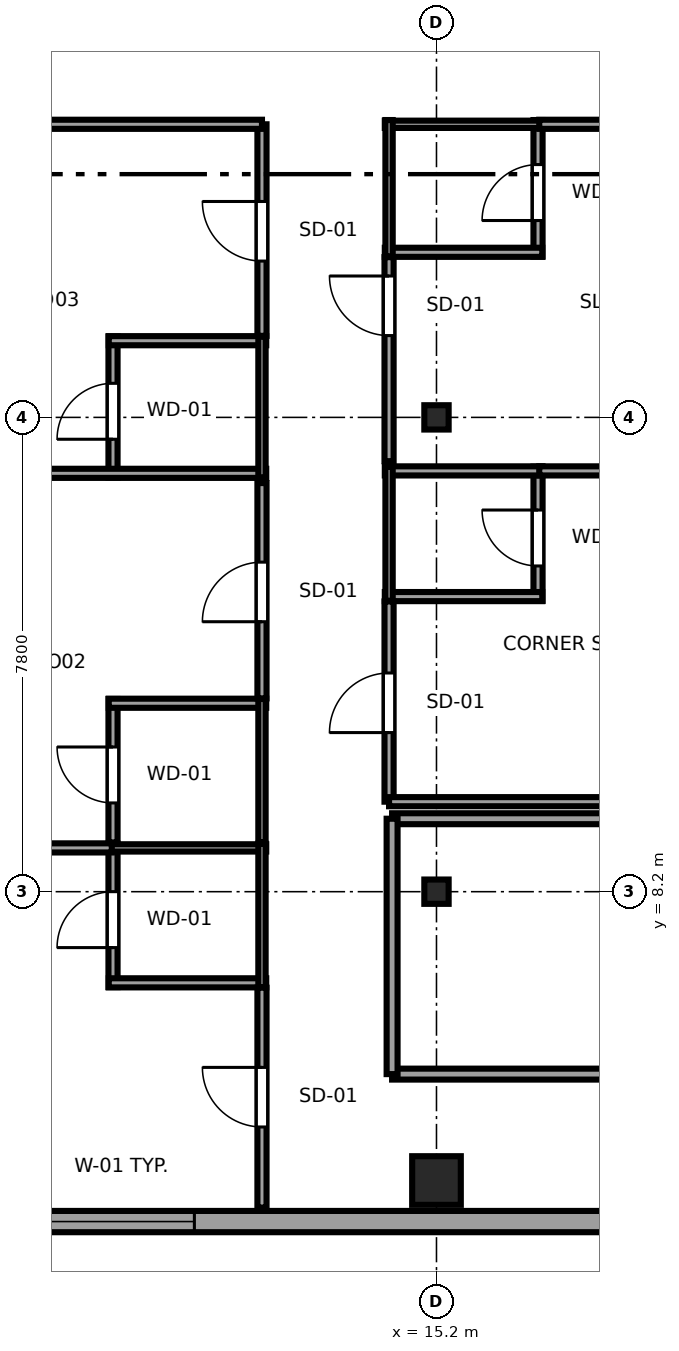
"""IFC4 building model, lengths in metres.
Left out: names, types, materials, properties, quantities, classifications, styles, units other than length and angle.
Written with IfcOpenShell. Run it as: python <this file> out.ifc"""

import sys

from ifc_helpers import new_model, si_unit, direction, frame, frame_2d, origin, origin_2d, place, context, subcontext, project, spatial, rectangle, i_section, extrude, source, transform, mapped, element, fill, save


model = new_model("IFC4")
c1 = context("Model", 3, precision=1e-05, world=origin(), true_north=direction((0.0, 1.0)))
c2 = subcontext(c1, "Body", "Model", "MODEL_VIEW")
j1 = project(units=[si_unit("LENGTHUNIT", "METRE"), si_unit("PLANEANGLEUNIT", "RADIAN")], contexts=[c1])
p1 = place(None, origin())
s1 = spatial("IfcSite", under=j1, at=p1, CompositionType="ELEMENT")
p2 = place(p1, origin())
s2 = spatial("IfcBuilding", under=s1, at=p2, CompositionType="ELEMENT")
p3 = place(p2, frame((0.0, 0.0, 168.35)))
s3 = spatial("IfcBuildingStorey", under=s2, at=p3, CompositionType="ELEMENT", Elevation=168.35)
m1 = source(origin(), c2, "Body", "SweptSolid", [
    extrude(rectangle(XDim=0.8, YDim=0.8, at=origin_2d()), origin(), (0.0, 0.0, 1.0), 3.55),
])
p4 = place(p3, frame((15.2, 3.45, 0.0), z_axis=(0.0, 0.0, 1.0), x_axis=(1.0, 0.0, 0.0)))
e1 = element("IfcColumn", 1, at=p4, inside=s3, PredefinedType="COLUMN", context=c2, shape_type="MappedRepresentation", body=[
    mapped(m1, transform((0.0, 0.0, 0.0), x_axis=(1.0, 0.0, 0.0), y_axis=(0.0, 1.0, 0.0), z_axis=(0.0, 0.0, 1.0), scale=1.0)),
])
m2 = source(origin(), c2, "Body", "SweptSolid", [
    extrude(i_section(OverallWidth=0.4, OverallDepth=0.4, WebThickness=0.02, FlangeThickness=0.035, at=origin_2d()), origin(), (0.0, 0.0, 1.0), 3.55),
])
for number, where, z_axis, x_axis in (
    (2, (15.2, 8.2, 0.0), (0.0, 0.0, 1.0), (1.0, 0.0, 0.0)),
    (3, (15.2, 16.0, 0.0), (0.0, 0.0, 1.0), (1.0, 0.0, 0.0)),
):
    element("IfcColumn", number, at=place(p3, frame(where, z_axis=z_axis, x_axis=x_axis)), inside=s3, PredefinedType="COLUMN", context=c2, shape_type="MappedRepresentation", body=[
        mapped(m2, transform((0.0, 0.0, 0.0), x_axis=(1.0, 0.0, 0.0), y_axis=(0.0, 1.0, 0.0), z_axis=(0.0, 0.0, 1.0), scale=1.0)),
    ])
p5 = place(p3, frame((7.017, 2.775, 0.0), z_axis=(0.0, 0.0, 1.0), x_axis=(1.0, 0.0, 0.0)))
e4 = element("IfcWall", 4, at=p5, inside=s3, PredefinedType="SOLIDWALL", context=c2, shape_type="SweptSolid", body=[
    extrude(rectangle(XDim=15.608, YDim=0.35, at=frame_2d((7.804, 0.0))), origin(), (0.0, 0.0, 1.0), 3.37),
])
p6 = place(p5, frame((1.801, 0.0, 0.68)))
e5 = element("IfcOpeningElement", 5, at=p6, cuts=e4, PredefinedType="OPENING", context=c2, shape_type="SweptSolid", body=[
    extrude(rectangle(XDim=2.4, YDim=1.9, at=frame_2d((1.2, 0.95))), frame((0.0, 0.185, 0.0), z_axis=(0.0, -1.0, 0.0), x_axis=(1.0, 0.0, 0.0)), (0.0, 0.0, 1.0), 0.37),
])
p7 = place(p5, frame((11.407, 0.0, 0.68)))
e6 = element("IfcOpeningElement", 6, at=p7, cuts=e4, PredefinedType="OPENING", context=c2, shape_type="SweptSolid", body=[
    extrude(rectangle(XDim=2.4, YDim=1.9, at=frame_2d((1.2, 0.95))), frame((0.0, 0.185, 0.0), z_axis=(0.0, -1.0, 0.0), x_axis=(1.0, 0.0, 0.0)), (0.0, 0.0, 1.0), 0.37),
])
p8 = place(p3, frame((9.88, 6.631, 0.0), z_axis=(0.0, 0.0, 1.0), x_axis=(0.0, 1.0, 0.0)))
e7 = element("IfcWall", 7, at=p8, inside=s3, PredefinedType="PARTITIONING", context=c2, shape_type="SweptSolid", body=[
    extrude(rectangle(XDim=2.359, YDim=0.15, at=frame_2d((1.179, 0.0))), origin(), (0.0, 0.0, 1.0), 3.37),
])
p9 = place(p8, frame((0.649, 0.0, 0.0)))
e8 = element("IfcOpeningElement", 8, at=p9, cuts=e7, PredefinedType="OPENING", context=c2, shape_type="SweptSolid", body=[
    extrude(rectangle(XDim=0.92, YDim=2.01, at=frame_2d((0.46, 1.005))), frame((0.0, 0.085, 0.0), z_axis=(0.0, -1.0, 0.0), x_axis=(1.0, 0.0, 0.0)), (0.0, 0.0, 1.0), 0.17),
])
p10 = place(p3, frame((9.81, 6.701, 0.0), z_axis=(0.0, 0.0, 1.0), x_axis=(1.0, 0.0, 0.0)))
e9 = element("IfcWall", 9, at=p10, inside=s3, PredefinedType="PARTITIONING", context=c2, shape_type="SweptSolid", body=[
    extrude(rectangle(XDim=2.59, YDim=0.15, at=frame_2d((1.295, 0.0))), origin(), (0.0, 0.0, 1.0), 3.37),
])
p11 = place(p3, frame((9.81, 8.92, 0.0), z_axis=(0.0, 0.0, 1.0), x_axis=(1.0, 0.0, 0.0)))
e10 = element("IfcWall", 10, at=p11, inside=s3, PredefinedType="PLUMBINGWALL", context=c2, shape_type="SweptSolid", body=[
    extrude(rectangle(XDim=2.59, YDim=0.12, at=frame_2d((1.295, 0.0))), origin(), (0.0, 0.0, 1.0), 3.37),
])
p12 = place(p3, frame((12.33, 6.631, 0.0), z_axis=(0.0, 0.0, 1.0), x_axis=(0.0, 1.0, 0.0)))
e11 = element("IfcWall", 11, at=p12, inside=s3, PredefinedType="PLUMBINGWALL", context=c2, shape_type="SweptSolid", body=[
    extrude(rectangle(XDim=2.359, YDim=0.12, at=frame_2d((1.179, 0.0))), origin(), (0.0, 0.0, 1.0), 3.37),
])
p13 = place(p3, frame((9.88, 9.01, 0.0), z_axis=(0.0, 0.0, 1.0), x_axis=(0.0, 1.0, 0.0)))
e12 = element("IfcWall", 12, at=p13, inside=s3, PredefinedType="PARTITIONING", context=c2, shape_type="SweptSolid", body=[
    extrude(rectangle(XDim=2.359, YDim=0.15, at=frame_2d((1.179, 0.0))), origin(), (0.0, 0.0, 1.0), 3.37),
])
p14 = place(p13, frame((0.649, 0.0, 0.0)))
e13 = element("IfcOpeningElement", 13, at=p14, cuts=e12, PredefinedType="OPENING", context=c2, shape_type="SweptSolid", body=[
    extrude(rectangle(XDim=0.92, YDim=2.01, at=frame_2d((0.46, 1.005))), frame((0.0, 0.085, 0.0), z_axis=(0.0, -1.0, 0.0), x_axis=(1.0, 0.0, 0.0)), (0.0, 0.0, 1.0), 0.17),
])
p15 = place(p3, frame((9.81, 11.299, 0.0), z_axis=(0.0, 0.0, 1.0), x_axis=(1.0, 0.0, 0.0)))
e14 = element("IfcWall", 14, at=p15, inside=s3, PredefinedType="PARTITIONING", context=c2, shape_type="SweptSolid", body=[
    extrude(rectangle(XDim=2.59, YDim=0.15, at=frame_2d((1.295, 0.0))), origin(), (0.0, 0.0, 1.0), 3.37),
])
p16 = place(p3, frame((12.33, 9.01, 0.0), z_axis=(0.0, 0.0, 1.0), x_axis=(0.0, 1.0, 0.0)))
e15 = element("IfcWall", 15, at=p16, inside=s3, PredefinedType="PLUMBINGWALL", context=c2, shape_type="SweptSolid", body=[
    extrude(rectangle(XDim=2.359, YDim=0.12, at=frame_2d((1.179, 0.0))), origin(), (0.0, 0.0, 1.0), 3.37),
])
p17 = place(p3, frame((9.88, 15.01, 0.0), z_axis=(0.0, 0.0, 1.0), x_axis=(0.0, 1.0, 0.0)))
e16 = element("IfcWall", 16, at=p17, inside=s3, PredefinedType="PARTITIONING", context=c2, shape_type="SweptSolid", body=[
    extrude(rectangle(XDim=2.321, YDim=0.15, at=frame_2d((1.161, 0.0))), origin(), (0.0, 0.0, 1.0), 3.37),
])
p18 = place(p17, frame((0.631, 0.0, 0.0)))
e17 = element("IfcOpeningElement", 17, at=p18, cuts=e16, PredefinedType="OPENING", context=c2, shape_type="SweptSolid", body=[
    extrude(rectangle(XDim=0.92, YDim=2.01, at=frame_2d((0.46, 1.005))), frame((0.0, 0.085, 0.0), z_axis=(0.0, -1.0, 0.0), x_axis=(1.0, 0.0, 0.0)), (0.0, 0.0, 1.0), 0.17),
])
p19 = place(p3, frame((3.005, 15.08, 0.0), z_axis=(0.0, 0.0, 1.0), x_axis=(1.0, 0.0, 0.0)))
e18 = element("IfcWall", 18, at=p19, inside=s3, PredefinedType="PARTITIONING", context=c2, shape_type="SweptSolid", body=[
    extrude(rectangle(XDim=9.395, YDim=0.15, at=frame_2d((4.698, 0.0))), origin(), (0.0, 0.0, 1.0), 3.37),
])
p20 = place(p3, frame((9.81, 17.261, 0.0), z_axis=(0.0, 0.0, 1.0), x_axis=(1.0, 0.0, 0.0)))
e19 = element("IfcWall", 19, at=p20, inside=s3, PredefinedType="PARTITIONING", context=c2, shape_type="SweptSolid", body=[
    extrude(rectangle(XDim=2.59, YDim=0.15, at=frame_2d((1.295, 0.0))), origin(), (0.0, 0.0, 1.0), 3.37),
])
p21 = place(p3, frame((12.33, 15.01, 0.0), z_axis=(0.0, 0.0, 1.0), x_axis=(0.0, 1.0, 0.0)))
e20 = element("IfcWall", 20, at=p21, inside=s3, PredefinedType="PLUMBINGWALL", context=c2, shape_type="SweptSolid", body=[
    extrude(rectangle(XDim=2.321, YDim=0.12, at=frame_2d((1.161, 0.0))), origin(), (0.0, 0.0, 1.0), 3.37),
])
p22 = place(p3, frame((16.87, 12.983, 0.0), z_axis=(0.0, 0.0, 1.0), x_axis=(0.0, 1.0, 0.0)))
e21 = element("IfcWall", 21, at=p22, inside=s3, PredefinedType="PARTITIONING", context=c2, shape_type="SweptSolid", body=[
    extrude(rectangle(XDim=2.207, YDim=0.15, at=frame_2d((1.104, 0.0))), origin(), (0.0, 0.0, 1.0), 3.37),
])
p23 = place(p22, frame((0.573, 0.0, 0.0)))
e22 = element("IfcOpeningElement", 22, at=p23, cuts=e21, PredefinedType="OPENING", context=c2, shape_type="SweptSolid", body=[
    extrude(rectangle(XDim=0.92, YDim=2.01, at=frame_2d((0.46, 1.005))), frame((0.0, 0.085, 0.0), z_axis=(0.0, -1.0, 0.0), x_axis=(1.0, 0.0, 0.0)), (0.0, 0.0, 1.0), 0.17),
])
for number, where, z_axis, x_axis in (
    (23, (14.35, 13.053, 0.0), (0.0, 0.0, 1.0), (1.0, 0.0, 0.0)),
    (24, (14.35, 15.12, 0.0), (0.0, 0.0, 1.0), (1.0, 0.0, 0.0)),
):
    element("IfcWall", number, at=place(p3, frame(where, z_axis=z_axis, x_axis=x_axis)), inside=s3, PredefinedType="PARTITIONING", context=c2, shape_type="SweptSolid", body=[
        extrude(rectangle(XDim=2.59, YDim=0.15, at=frame_2d((1.295, 0.0))), origin(), (0.0, 0.0, 1.0), 3.37),
    ])
p24 = place(p3, frame((14.42, 12.983, 0.0), z_axis=(0.0, 0.0, 1.0), x_axis=(0.0, 1.0, 0.0)))
e25 = element("IfcWall", 25, at=p24, inside=s3, PredefinedType="PLUMBINGWALL", context=c2, shape_type="SweptSolid", body=[
    extrude(rectangle(XDim=2.207, YDim=0.12, at=frame_2d((1.104, 0.0))), origin(), (0.0, 0.0, 1.0), 3.37),
])
p25 = place(p3, frame((16.87, 18.645, 0.0), z_axis=(0.0, 0.0, 1.0), x_axis=(0.0, 1.0, 0.0)))
e26 = element("IfcWall", 26, at=p25, inside=s3, PredefinedType="PARTITIONING", context=c2, shape_type="SweptSolid", body=[
    extrude(rectangle(XDim=2.245, YDim=0.15, at=frame_2d((1.123, 0.0))), origin(), (0.0, 0.0, 1.0), 3.37),
])
p26 = place(p25, frame((0.593, 0.0, 0.0)))
e27 = element("IfcOpeningElement", 27, at=p26, cuts=e26, PredefinedType="OPENING", context=c2, shape_type="SweptSolid", body=[
    extrude(rectangle(XDim=0.92, YDim=2.01, at=frame_2d((0.46, 1.005))), frame((0.0, 0.085, 0.0), z_axis=(0.0, -1.0, 0.0), x_axis=(1.0, 0.0, 0.0)), (0.0, 0.0, 1.0), 0.17),
])
p27 = place(p3, frame((14.35, 18.715, 0.0), z_axis=(0.0, 0.0, 1.0), x_axis=(1.0, 0.0, 0.0)))
e28 = element("IfcWall", 28, at=p27, inside=s3, PredefinedType="PARTITIONING", context=c2, shape_type="SweptSolid", body=[
    extrude(rectangle(XDim=2.59, YDim=0.15, at=frame_2d((1.295, 0.0))), origin(), (0.0, 0.0, 1.0), 3.37),
])
p28 = place(p3, frame((14.35, 20.82, 0.0), z_axis=(0.0, 0.0, 1.0), x_axis=(1.0, 0.0, 0.0)))
e29 = element("IfcWall", 29, at=p28, inside=s3, PredefinedType="PLUMBINGWALL", context=c2, shape_type="SweptSolid", body=[
    extrude(rectangle(XDim=2.59, YDim=0.12, at=frame_2d((1.295, 0.0))), origin(), (0.0, 0.0, 1.0), 3.37),
])
p29 = place(p3, frame((14.42, 18.645, 0.0), z_axis=(0.0, 0.0, 1.0), x_axis=(0.0, 1.0, 0.0)))
e30 = element("IfcWall", 30, at=p29, inside=s3, PredefinedType="PLUMBINGWALL", context=c2, shape_type="SweptSolid", body=[
    extrude(rectangle(XDim=2.245, YDim=0.12, at=frame_2d((1.123, 0.0))), origin(), (0.0, 0.0, 1.0), 3.37),
])
p30 = place(p3, frame((12.33, 3.005, 0.0), z_axis=(0.0, 0.0, 1.0), x_axis=(0.0, 1.0, 0.0)))
e31 = element("IfcWall", 31, at=p30, inside=s3, PredefinedType="PARTITIONING", context=c2, shape_type="SweptSolid", body=[
    extrude(rectangle(XDim=3.616, YDim=0.15, at=frame_2d((1.808, 0.0))), origin(), (0.0, 0.0, 1.0), 3.37),
])
p31 = place(p30, frame((1.325, 0.0, 0.0)))
e32 = element("IfcOpeningElement", 32, at=p31, cuts=e31, PredefinedType="OPENING", context=c2, shape_type="SweptSolid", body=[
    extrude(rectangle(XDim=0.98, YDim=2.12, at=frame_2d((0.49, 1.06))), frame((0.0, 0.085, 0.0), z_axis=(0.0, -1.0, 0.0), x_axis=(1.0, 0.0, 0.0)), (0.0, 0.0, 1.0), 0.17),
])
p32 = place(p3, frame((3.005, 8.92, 0.0), z_axis=(0.0, 0.0, 1.0), x_axis=(1.0, 0.0, 0.0)))
e33 = element("IfcWall", 33, at=p32, inside=s3, PredefinedType="PARTITIONING", context=c2, shape_type="SweptSolid", body=[
    extrude(rectangle(XDim=6.855, YDim=0.15, at=frame_2d((3.428, 0.0))), origin(), (0.0, 0.0, 1.0), 3.37),
])
p33 = place(p3, frame((12.33, 11.379, 0.0), z_axis=(0.0, 0.0, 1.0), x_axis=(0.0, 1.0, 0.0)))
e34 = element("IfcWall", 34, at=p33, inside=s3, PredefinedType="PARTITIONING", context=c2, shape_type="SweptSolid", body=[
    extrude(rectangle(XDim=3.541, YDim=0.15, at=frame_2d((1.771, 0.0))), origin(), (0.0, 0.0, 1.0), 3.37),
])
p34 = place(p33, frame((1.26, 0.0, 0.0)))
e35 = element("IfcOpeningElement", 35, at=p34, cuts=e34, PredefinedType="OPENING", context=c2, shape_type="SweptSolid", body=[
    extrude(rectangle(XDim=0.98, YDim=2.12, at=frame_2d((0.49, 1.06))), frame((0.0, 0.085, 0.0), z_axis=(0.0, -1.0, 0.0), x_axis=(1.0, 0.0, 0.0)), (0.0, 0.0, 1.0), 0.17),
])
p35 = place(p3, frame((12.33, 17.341, 0.0), z_axis=(0.0, 0.0, 1.0), x_axis=(0.0, 1.0, 0.0)))
e36 = element("IfcWall", 36, at=p35, inside=s3, PredefinedType="PARTITIONING", context=c2, shape_type="SweptSolid", body=[
    extrude(rectangle(XDim=3.479, YDim=0.15, at=frame_2d((1.74, 0.0))), origin(), (0.0, 0.0, 1.0), 3.37),
])
p36 = place(p35, frame((1.229, 0.0, 0.0)))
e37 = element("IfcOpeningElement", 37, at=p36, cuts=e36, PredefinedType="OPENING", context=c2, shape_type="SweptSolid", body=[
    extrude(rectangle(XDim=0.98, YDim=2.12, at=frame_2d((0.49, 1.06))), frame((0.0, 0.085, 0.0), z_axis=(0.0, -1.0, 0.0), x_axis=(1.0, 0.0, 0.0)), (0.0, 0.0, 1.0), 0.17),
])
p37 = place(p3, frame((3.005, 20.82, 0.0), z_axis=(0.0, 0.0, 1.0), x_axis=(1.0, 0.0, 0.0)))
e38 = element("IfcWall", 38, at=p37, inside=s3, PredefinedType="PARTITIONING", context=c2, shape_type="SweptSolid", body=[
    extrude(rectangle(XDim=9.325, YDim=0.15, at=frame_2d((4.663, 0.0))), origin(), (0.0, 0.0, 1.0), 3.37),
])
p38 = place(p3, frame((14.42, 9.68, 0.0), z_axis=(0.0, 0.0, 1.0), x_axis=(0.0, 1.0, 0.0)))
e39 = element("IfcWall", 39, at=p38, inside=s3, PredefinedType="PARTITIONING", context=c2, shape_type="SweptSolid", body=[
    extrude(rectangle(XDim=3.293, YDim=0.15, at=frame_2d((1.646, 0.0))), origin(), (0.0, 0.0, 1.0), 3.37),
])
p39 = place(p38, frame((1.136, 0.0, 0.0)))
e40 = element("IfcOpeningElement", 40, at=p39, cuts=e39, PredefinedType="OPENING", context=c2, shape_type="SweptSolid", body=[
    extrude(rectangle(XDim=0.98, YDim=2.12, at=frame_2d((0.49, 1.06))), frame((0.0, 0.085, 0.0), z_axis=(0.0, -1.0, 0.0), x_axis=(1.0, 0.0, 0.0)), (0.0, 0.0, 1.0), 0.17),
])
p40 = place(p3, frame((14.42, 9.68, 0.0), z_axis=(0.0, 0.0, 1.0), x_axis=(1.0, 0.0, 0.0)))
e41 = element("IfcWall", 41, at=p40, inside=s3, PredefinedType="PARTITIONING", context=c2, shape_type="SweptSolid", body=[
    extrude(rectangle(XDim=7.93, YDim=0.15, at=frame_2d((3.965, 0.0))), origin(), (0.0, 0.0, 1.0), 2.748),
])
p41 = place(p3, frame((16.89, 15.12, 0.0), z_axis=(0.0, 0.0, 1.0), x_axis=(1.0, 0.0, 0.0)))
e42 = element("IfcWall", 42, at=p41, inside=s3, PredefinedType="PARTITIONING", context=c2, shape_type="SweptSolid", body=[
    extrude(rectangle(XDim=5.46, YDim=0.15, at=frame_2d((2.73, 0.0))), origin(), (0.0, 0.0, 1.0), 3.37),
])
p42 = place(p3, frame((14.42, 15.28, 0.0), z_axis=(0.0, 0.0, 1.0), x_axis=(0.0, 1.0, 0.0)))
e43 = element("IfcWall", 43, at=p42, inside=s3, PredefinedType="PARTITIONING", context=c2, shape_type="SweptSolid", body=[
    extrude(rectangle(XDim=3.355, YDim=0.15, at=frame_2d((1.677, 0.0))), origin(), (0.0, 0.0, 1.0), 3.37),
])
p43 = place(p42, frame((2.065, 0.0, 0.0)))
e44 = element("IfcOpeningElement", 44, at=p43, cuts=e43, PredefinedType="OPENING", context=c2, shape_type="SweptSolid", body=[
    extrude(rectangle(XDim=0.98, YDim=2.12, at=frame_2d((0.49, 1.06))), frame((0.0, 0.085, 0.0), z_axis=(0.0, -1.0, 0.0), x_axis=(1.0, 0.0, 0.0)), (0.0, 0.0, 1.0), 0.17),
])
p44 = place(p3, frame((16.89, 20.82, 0.0), z_axis=(0.0, 0.0, 1.0), x_axis=(1.0, 0.0, 0.0)))
e45 = element("IfcWall", 45, at=p44, inside=s3, PredefinedType="PARTITIONING", context=c2, shape_type="SweptSolid", body=[
    extrude(rectangle(XDim=5.46, YDim=0.15, at=frame_2d((2.73, 0.0))), origin(), (0.0, 0.0, 1.0), 3.37),
])
for number, where, z_axis, x_axis in (
    (46, (14.47, 5.2, 0.0), (0.0, 0.0, 1.0), (1.0, 0.0, 0.0)),
    (47, (14.47, 9.4, 0.0), (0.0, 0.0, 1.0), (1.0, 0.0, 0.0)),
):
    element("IfcWall", number, at=place(p3, frame(where, z_axis=z_axis, x_axis=x_axis)), inside=s3, PredefinedType="PARTITIONING", context=c2, shape_type="SweptSolid", body=[
        extrude(rectangle(XDim=28.51, YDim=0.18, at=frame_2d((14.255, 0.0))), origin(), (0.0, 0.0, 1.0), 3.37),
    ])
p45 = place(p3, frame((14.47, 5.2, 0.0), z_axis=(0.0, 0.0, 1.0), x_axis=(0.0, 1.0, 0.0)))
e48 = element("IfcWall", 48, at=p45, inside=s3, PredefinedType="PARTITIONING", context=c2, shape_type="SweptSolid", body=[
    extrude(rectangle(XDim=4.2, YDim=0.18, at=frame_2d((2.1, 0.0))), origin(), (0.0, 0.0, 1.0), 3.37),
])
m3 = source(origin(), c2, "Body", "SweptSolid", [
    extrude(rectangle(XDim=2.4, YDim=1.9, at=frame_2d((1.2, 0.95))), frame((0.0, 0.09, 0.0), z_axis=(0.0, -1.0, 0.0), x_axis=(1.0, 0.0, 0.0)), (0.0, 0.0, 1.0), 0.06),
])
p46 = place(p6, origin())
e49 = element("IfcWindow", 49, at=p46, inside=s3, PartitioningType="TRIPLE_PANEL_HORIZONTAL", PredefinedType="WINDOW", context=c2, shape_type="MappedRepresentation", body=[
    mapped(m3, transform((0.0, 0.0, 0.0), x_axis=(1.0, 0.0, 0.0), y_axis=(0.0, 1.0, 0.0), z_axis=(0.0, 0.0, 1.0), scale=1.0)),
])
fill(e5, e49)
m4 = source(origin(), c2, "Body", "SweptSolid", [
    extrude(rectangle(XDim=0.92, YDim=2.01, at=frame_2d((0.46, 1.005))), frame((0.0, 0.025, 0.0), z_axis=(0.0, -1.0, 0.0), x_axis=(1.0, 0.0, 0.0)), (0.0, 0.0, 1.0), 0.05),
])
p47 = place(p9, origin())
e50 = element("IfcDoor", 50, at=p47, inside=s3, OperationType="SINGLE_SWING_LEFT", PredefinedType="DOOR", context=c2, shape_type="MappedRepresentation", body=[
    mapped(m4, transform((0.0, 0.0, 0.0), x_axis=(1.0, 0.0, 0.0), y_axis=(0.0, 1.0, 0.0), z_axis=(0.0, 0.0, 1.0), scale=1.0)),
])
fill(e8, e50)
p48 = place(p14, origin())
e51 = element("IfcDoor", 51, at=p48, inside=s3, OperationType="SINGLE_SWING_RIGHT", PredefinedType="DOOR", context=c2, shape_type="MappedRepresentation", body=[
    mapped(m4, transform((0.0, 0.0, 0.0), x_axis=(1.0, 0.0, 0.0), y_axis=(0.0, 1.0, 0.0), z_axis=(0.0, 0.0, 1.0), scale=1.0)),
])
fill(e13, e51)
p49 = place(p18, origin())
e52 = element("IfcDoor", 52, at=p49, inside=s3, OperationType="SINGLE_SWING_LEFT", PredefinedType="DOOR", context=c2, shape_type="MappedRepresentation", body=[
    mapped(m4, transform((0.0, 0.0, 0.0), x_axis=(1.0, 0.0, 0.0), y_axis=(0.0, 1.0, 0.0), z_axis=(0.0, 0.0, 1.0), scale=1.0)),
])
fill(e17, e52)
p50 = place(p23, origin())
e53 = element("IfcDoor", 53, at=p50, inside=s3, OperationType="SINGLE_SWING_RIGHT", PredefinedType="DOOR", context=c2, shape_type="MappedRepresentation", body=[
    mapped(m4, transform((0.0, 0.0, 0.0), x_axis=(1.0, 0.0, 0.0), y_axis=(0.0, 1.0, 0.0), z_axis=(0.0, 0.0, 1.0), scale=1.0)),
])
fill(e22, e53)
p51 = place(p26, origin())
e54 = element("IfcDoor", 54, at=p51, inside=s3, OperationType="SINGLE_SWING_LEFT", PredefinedType="DOOR", context=c2, shape_type="MappedRepresentation", body=[
    mapped(m4, transform((0.0, 0.0, 0.0), x_axis=(1.0, 0.0, 0.0), y_axis=(0.0, 1.0, 0.0), z_axis=(0.0, 0.0, 1.0), scale=1.0)),
])
fill(e27, e54)
m5 = source(origin(), c2, "Body", "SweptSolid", [
    extrude(rectangle(XDim=0.98, YDim=2.12, at=frame_2d((0.49, 1.06))), frame((0.0, 0.025, 0.0), z_axis=(0.0, -1.0, 0.0), x_axis=(1.0, 0.0, 0.0)), (0.0, 0.0, 1.0), 0.05),
])
p52 = place(p31, origin())
e55 = element("IfcDoor", 55, at=p52, inside=s3, OperationType="SINGLE_SWING_RIGHT", PredefinedType="DOOR", context=c2, shape_type="MappedRepresentation", body=[
    mapped(m5, transform((0.0, 0.0, 0.0), x_axis=(1.0, 0.0, 0.0), y_axis=(0.0, 1.0, 0.0), z_axis=(0.0, 0.0, 1.0), scale=1.0)),
])
fill(e32, e55)
p53 = place(p34, origin())
e56 = element("IfcDoor", 56, at=p53, inside=s3, OperationType="SINGLE_SWING_LEFT", PredefinedType="DOOR", context=c2, shape_type="MappedRepresentation", body=[
    mapped(m5, transform((0.0, 0.0, 0.0), x_axis=(1.0, 0.0, 0.0), y_axis=(0.0, 1.0, 0.0), z_axis=(0.0, 0.0, 1.0), scale=1.0)),
])
fill(e35, e56)
p54 = place(p36, origin())
e57 = element("IfcDoor", 57, at=p54, inside=s3, OperationType="SINGLE_SWING_RIGHT", PredefinedType="DOOR", context=c2, shape_type="MappedRepresentation", body=[
    mapped(m5, transform((0.0, 0.0, 0.0), x_axis=(1.0, 0.0, 0.0), y_axis=(0.0, 1.0, 0.0), z_axis=(0.0, 0.0, 1.0), scale=1.0)),
])
fill(e37, e57)
p55 = place(p39, origin())
e58 = element("IfcDoor", 58, at=p55, inside=s3, OperationType="SINGLE_SWING_LEFT", PredefinedType="DOOR", context=c2, shape_type="MappedRepresentation", body=[
    mapped(m5, transform((0.0, 0.0, 0.0), x_axis=(1.0, 0.0, 0.0), y_axis=(0.0, 1.0, 0.0), z_axis=(0.0, 0.0, 1.0), scale=1.0)),
])
fill(e40, e58)
p56 = place(p43, origin())
e59 = element("IfcDoor", 59, at=p56, inside=s3, OperationType="SINGLE_SWING_RIGHT", PredefinedType="DOOR", context=c2, shape_type="MappedRepresentation", body=[
    mapped(m5, transform((0.0, 0.0, 0.0), x_axis=(1.0, 0.0, 0.0), y_axis=(0.0, 1.0, 0.0), z_axis=(0.0, 0.0, 1.0), scale=1.0)),
])
fill(e44, e59)
save(model, sys.argv[1])
